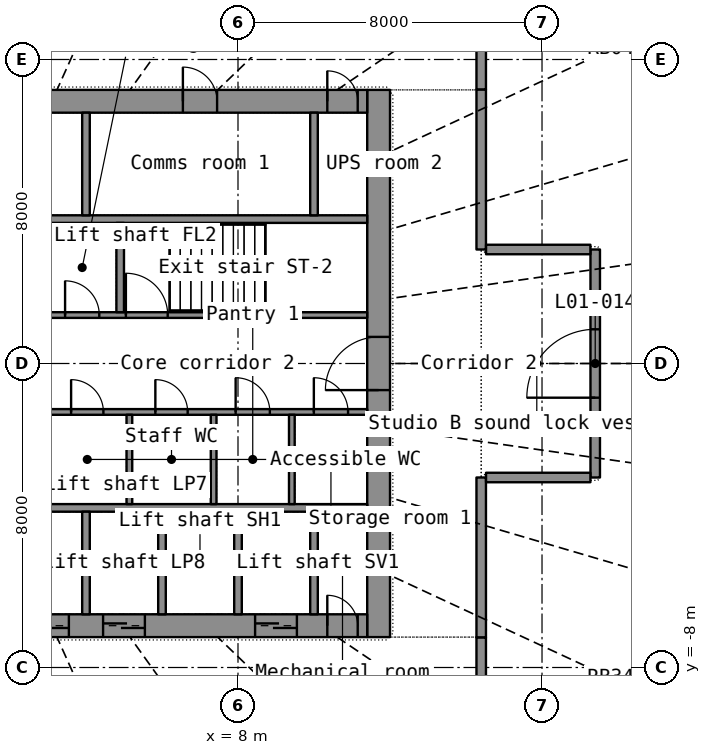
"""IFC4 building model, lengths in metres.
Left out: names, types, materials, properties, quantities, classifications, styles, units other than length and angle.
Written with IfcOpenShell. Run it as: python <this file> out.ifc"""

import sys

from ifc_helpers import new_model, si_unit, direction, frame, frame_2d, origin, place, context, subcontext, project, spatial, rectangle, extrude, element, fill, save


model = new_model("IFC4")
c1 = context("Model", 3, precision=1e-05, world=origin(), true_north=direction((0.0, 1.0)))
c2 = subcontext(c1, "Body", "Model", "MODEL_VIEW")
j1 = project(units=[si_unit("LENGTHUNIT", "METRE"), si_unit("PLANEANGLEUNIT", "RADIAN")], contexts=[c1])
p1 = place(None, origin())
s1 = spatial("IfcSite", under=j1, at=p1, CompositionType="ELEMENT")
p2 = place(p1, origin())
s2 = spatial("IfcBuilding", under=s1, at=p2, CompositionType="ELEMENT")
p3 = place(p2, frame((0.0, 0.0, 7.0)))
s3 = spatial("IfcBuildingStorey", under=s2, at=p3, CompositionType="ELEMENT", Elevation=7.0)
p4 = place(p3, frame((11.7, -7.2, 0.0), z_axis=(0.0, 0.0, 1.0), x_axis=(0.0, 1.0, 0.0)))
e1 = element("IfcWall", 1, at=p4, inside=s3, PredefinedType="SHEAR", context=c2, shape_type="SweptSolid", body=[
    extrude(rectangle(XDim=14.4, YDim=0.6, at=frame_2d((7.2, 0.0))), origin(), (0.0, 0.0, 1.0), 6.1),
])
p5 = place(p4, frame((6.5, 0.0, 0.0)))
e2 = element("IfcOpeningElement", 2, at=p5, cuts=e1, PredefinedType="OPENING", context=c2, shape_type="SweptSolid", body=[
    extrude(rectangle(XDim=1.4, YDim=2.2, at=frame_2d((0.7, 1.1))), frame((0.0, 0.31, 0.0), z_axis=(0.0, -1.0, 0.0), x_axis=(1.0, 0.0, 0.0)), (0.0, 0.0, 1.0), 0.62),
])
p6 = place(p3, frame((-11.4, -6.9, 0.0), z_axis=(0.0, 0.0, 1.0), x_axis=(1.0, 0.0, 0.0)))
e3 = element("IfcWall", 3, at=p6, inside=s3, PredefinedType="SHEAR", context=c2, shape_type="SweptSolid", body=[
    extrude(rectangle(XDim=22.8, YDim=0.6, at=frame_2d((11.4, 0.0))), origin(), (0.0, 0.0, 1.0), 6.1),
])
p7 = place(p6, frame((1.85, 0.0, 0.0)))
e4 = element("IfcOpeningElement", 4, at=p7, cuts=e3, PredefinedType="OPENING", context=c2, shape_type="SweptSolid", body=[
    extrude(rectangle(XDim=1.1, YDim=2.2, at=frame_2d((0.55, 1.1))), frame((0.0, 0.31, 0.0), z_axis=(0.0, -1.0, 0.0), x_axis=(1.0, 0.0, 0.0)), (0.0, 0.0, 1.0), 0.62),
])
p8 = place(p6, frame((3.85, 0.0, 0.0)))
e5 = element("IfcOpeningElement", 5, at=p8, cuts=e3, PredefinedType="OPENING", context=c2, shape_type="SweptSolid", body=[
    extrude(rectangle(XDim=1.1, YDim=2.2, at=frame_2d((0.55, 1.1))), frame((0.0, 0.31, 0.0), z_axis=(0.0, -1.0, 0.0), x_axis=(1.0, 0.0, 0.0)), (0.0, 0.0, 1.0), 0.62),
])
p9 = place(p6, frame((5.85, 0.0, 0.0)))
e6 = element("IfcOpeningElement", 6, at=p9, cuts=e3, PredefinedType="OPENING", context=c2, shape_type="SweptSolid", body=[
    extrude(rectangle(XDim=1.1, YDim=2.2, at=frame_2d((0.55, 1.1))), frame((0.0, 0.31, 0.0), z_axis=(0.0, -1.0, 0.0), x_axis=(1.0, 0.0, 0.0)), (0.0, 0.0, 1.0), 0.62),
])
p10 = place(p6, frame((7.85, 0.0, 0.0)))
e7 = element("IfcOpeningElement", 7, at=p10, cuts=e3, PredefinedType="OPENING", context=c2, shape_type="SweptSolid", body=[
    extrude(rectangle(XDim=1.1, YDim=2.2, at=frame_2d((0.55, 1.1))), frame((0.0, 0.31, 0.0), z_axis=(0.0, -1.0, 0.0), x_axis=(1.0, 0.0, 0.0)), (0.0, 0.0, 1.0), 0.62),
])
p11 = place(p6, frame((9.85, 0.0, 0.0)))
e8 = element("IfcOpeningElement", 8, at=p11, cuts=e3, PredefinedType="OPENING", context=c2, shape_type="SweptSolid", body=[
    extrude(rectangle(XDim=1.1, YDim=2.2, at=frame_2d((0.55, 1.1))), frame((0.0, 0.31, 0.0), z_axis=(0.0, -1.0, 0.0), x_axis=(1.0, 0.0, 0.0)), (0.0, 0.0, 1.0), 0.62),
])
p12 = place(p6, frame((11.85, 0.0, 0.0)))
e9 = element("IfcOpeningElement", 9, at=p12, cuts=e3, PredefinedType="OPENING", context=c2, shape_type="SweptSolid", body=[
    extrude(rectangle(XDim=1.1, YDim=2.2, at=frame_2d((0.55, 1.1))), frame((0.0, 0.31, 0.0), z_axis=(0.0, -1.0, 0.0), x_axis=(1.0, 0.0, 0.0)), (0.0, 0.0, 1.0), 0.62),
])
p13 = place(p6, frame((13.85, 0.0, 0.0)))
e10 = element("IfcOpeningElement", 10, at=p13, cuts=e3, PredefinedType="OPENING", context=c2, shape_type="SweptSolid", body=[
    extrude(rectangle(XDim=1.1, YDim=2.2, at=frame_2d((0.55, 1.1))), frame((0.0, 0.31, 0.0), z_axis=(0.0, -1.0, 0.0), x_axis=(1.0, 0.0, 0.0)), (0.0, 0.0, 1.0), 0.62),
])
p14 = place(p6, frame((15.85, 0.0, 0.0)))
e11 = element("IfcOpeningElement", 11, at=p14, cuts=e3, PredefinedType="OPENING", context=c2, shape_type="SweptSolid", body=[
    extrude(rectangle(XDim=1.1, YDim=2.2, at=frame_2d((0.55, 1.1))), frame((0.0, 0.31, 0.0), z_axis=(0.0, -1.0, 0.0), x_axis=(1.0, 0.0, 0.0)), (0.0, 0.0, 1.0), 0.62),
])
p15 = place(p6, frame((19.85, 0.0, 0.0)))
e12 = element("IfcOpeningElement", 12, at=p15, cuts=e3, PredefinedType="OPENING", context=c2, shape_type="SweptSolid", body=[
    extrude(rectangle(XDim=1.1, YDim=2.2, at=frame_2d((0.55, 1.1))), frame((0.0, 0.31, 0.0), z_axis=(0.0, -1.0, 0.0), x_axis=(1.0, 0.0, 0.0)), (0.0, 0.0, 1.0), 0.62),
])
p16 = place(p6, frame((0.25, 0.0, 0.0)))
e13 = element("IfcOpeningElement", 13, at=p16, cuts=e3, PredefinedType="OPENING", context=c2, shape_type="SweptSolid", body=[
    extrude(rectangle(XDim=0.8, YDim=2.05, at=frame_2d((0.4, 1.025))), frame((0.0, 0.31, 0.0), z_axis=(0.0, -1.0, 0.0), x_axis=(1.0, 0.0, 0.0)), (0.0, 0.0, 1.0), 0.62),
])
p17 = place(p6, frame((21.75, 0.0, 0.0)))
e14 = element("IfcOpeningElement", 14, at=p17, cuts=e3, PredefinedType="OPENING", context=c2, shape_type="SweptSolid", body=[
    extrude(rectangle(XDim=0.8, YDim=2.05, at=frame_2d((0.4, 1.025))), frame((0.0, 0.31, 0.0), z_axis=(0.0, -1.0, 0.0), x_axis=(1.0, 0.0, 0.0)), (0.0, 0.0, 1.0), 0.62),
])
p18 = place(p3, frame((-11.4, 6.9, 0.0), z_axis=(0.0, 0.0, 1.0), x_axis=(1.0, 0.0, 0.0)))
e15 = element("IfcWall", 15, at=p18, inside=s3, PredefinedType="SHEAR", context=c2, shape_type="SweptSolid", body=[
    extrude(rectangle(XDim=22.8, YDim=0.6, at=frame_2d((11.4, 0.0))), origin(), (0.0, 0.0, 1.0), 6.1),
])
p19 = place(p18, frame((1.85, 0.0, 0.0)))
e16 = element("IfcOpeningElement", 16, at=p19, cuts=e15, PredefinedType="OPENING", context=c2, shape_type="SweptSolid", body=[
    extrude(rectangle(XDim=1.1, YDim=2.2, at=frame_2d((0.55, 1.1))), frame((0.0, 0.31, 0.0), z_axis=(0.0, -1.0, 0.0), x_axis=(1.0, 0.0, 0.0)), (0.0, 0.0, 1.0), 0.62),
])
p20 = place(p18, frame((6.95, 0.0, 0.0)))
e17 = element("IfcOpeningElement", 17, at=p20, cuts=e15, PredefinedType="OPENING", context=c2, shape_type="SweptSolid", body=[
    extrude(rectangle(XDim=0.9, YDim=2.1, at=frame_2d((0.45, 1.05))), frame((0.0, 0.31, 0.0), z_axis=(0.0, -1.0, 0.0), x_axis=(1.0, 0.0, 0.0)), (0.0, 0.0, 1.0), 0.62),
])
p21 = place(p18, frame((11.95, 0.0, 0.0)))
e18 = element("IfcOpeningElement", 18, at=p21, cuts=e15, PredefinedType="OPENING", context=c2, shape_type="SweptSolid", body=[
    extrude(rectangle(XDim=0.9, YDim=2.1, at=frame_2d((0.45, 1.05))), frame((0.0, 0.31, 0.0), z_axis=(0.0, -1.0, 0.0), x_axis=(1.0, 0.0, 0.0)), (0.0, 0.0, 1.0), 0.62),
])
p22 = place(p18, frame((17.95, 0.0, 0.0)))
e19 = element("IfcOpeningElement", 19, at=p22, cuts=e15, PredefinedType="OPENING", context=c2, shape_type="SweptSolid", body=[
    extrude(rectangle(XDim=0.9, YDim=2.1, at=frame_2d((0.45, 1.05))), frame((0.0, 0.31, 0.0), z_axis=(0.0, -1.0, 0.0), x_axis=(1.0, 0.0, 0.0)), (0.0, 0.0, 1.0), 0.62),
])
p23 = place(p18, frame((0.25, 0.0, 0.0)))
e20 = element("IfcOpeningElement", 20, at=p23, cuts=e15, PredefinedType="OPENING", context=c2, shape_type="SweptSolid", body=[
    extrude(rectangle(XDim=0.8, YDim=2.05, at=frame_2d((0.4, 1.025))), frame((0.0, 0.31, 0.0), z_axis=(0.0, -1.0, 0.0), x_axis=(1.0, 0.0, 0.0)), (0.0, 0.0, 1.0), 0.62),
])
p24 = place(p18, frame((21.75, 0.0, 0.0)))
e21 = element("IfcOpeningElement", 21, at=p24, cuts=e15, PredefinedType="OPENING", context=c2, shape_type="SweptSolid", body=[
    extrude(rectangle(XDim=0.8, YDim=2.05, at=frame_2d((0.4, 1.025))), frame((0.0, 0.31, 0.0), z_axis=(0.0, -1.0, 0.0), x_axis=(1.0, 0.0, 0.0)), (0.0, 0.0, 1.0), 0.62),
])
for number, where, z_axis, x_axis in (
    (22, (-11.4, -3.8, 0.0), (0.0, 0.0, 1.0), (1.0, 0.0, 0.0)),
    (23, (-11.4, 3.8, 0.0), (0.0, 0.0, 1.0), (1.0, 0.0, 0.0)),
):
    element("IfcWall", number, at=place(p3, frame(where, z_axis=z_axis, x_axis=x_axis)), inside=s3, PredefinedType="SHEAR", context=c2, shape_type="SweptSolid", body=[
        extrude(rectangle(XDim=22.8, YDim=0.2, at=frame_2d((11.4, 0.0))), origin(), (0.0, 0.0, 1.0), 6.1),
    ])
for number, where, z_axis, x_axis in (
    (24, (4.0, -6.6, 0.0), (0.0, 0.0, 1.0), (0.0, 1.0, 0.0)),
    (25, (6.0, -6.6, 0.0), (0.0, 0.0, 1.0), (0.0, 1.0, 0.0)),
    (26, (8.0, -6.6, 0.0), (0.0, 0.0, 1.0), (0.0, 1.0, 0.0)),
    (27, (10.0, -6.6, 0.0), (0.0, 0.0, 1.0), (0.0, 1.0, 0.0)),
    (28, (10.0, 3.9, 0.0), (0.0, 0.0, 1.0), (0.0, 1.0, 0.0)),
):
    element("IfcWall", number, at=place(p3, frame(where, z_axis=z_axis, x_axis=x_axis)), inside=s3, PredefinedType="SHEAR", context=c2, shape_type="SweptSolid", body=[
        extrude(rectangle(XDim=2.7, YDim=0.2, at=frame_2d((1.35, 0.0))), origin(), (0.0, 0.0, 1.0), 6.1),
    ])
p25 = place(p3, frame((4.0, 3.9, 0.0), z_axis=(0.0, 0.0, 1.0), x_axis=(0.0, 1.0, 0.0)))
e29 = element("IfcWall", 29, at=p25, inside=s3, PredefinedType="PARTITIONING", context=c2, shape_type="SweptSolid", body=[
    extrude(rectangle(XDim=2.7, YDim=0.2, at=frame_2d((1.35, 0.0))), origin(), (0.0, 0.0, 1.0), 6.1),
])
p26 = place(p3, frame((3.0, -1.275, 0.0), z_axis=(0.0, 0.0, 1.0), x_axis=(1.0, 0.0, 0.0)))
e30 = element("IfcWall", 30, at=p26, inside=s3, PredefinedType="PARTITIONING", context=c2, shape_type="SweptSolid", body=[
    extrude(rectangle(XDim=8.4, YDim=0.15, at=frame_2d((4.2, 0.0))), origin(), (0.0, 0.0, 1.0), 6.1),
])
p27 = place(p26, frame((0.608, 0.0, 0.0)))
e31 = element("IfcOpeningElement", 31, at=p27, cuts=e30, PredefinedType="OPENING", context=c2, shape_type="SweptSolid", body=[
    extrude(rectangle(XDim=0.85, YDim=2.1, at=frame_2d((0.425, 1.05))), frame((0.0, 0.085, 0.0), z_axis=(0.0, -1.0, 0.0), x_axis=(1.0, 0.0, 0.0)), (0.0, 0.0, 1.0), 0.17),
])
p28 = place(p26, frame((2.825, 0.0, 0.0)))
e32 = element("IfcOpeningElement", 32, at=p28, cuts=e30, PredefinedType="OPENING", context=c2, shape_type="SweptSolid", body=[
    extrude(rectangle(XDim=0.85, YDim=2.1, at=frame_2d((0.425, 1.05))), frame((0.0, 0.085, 0.0), z_axis=(0.0, -1.0, 0.0), x_axis=(1.0, 0.0, 0.0)), (0.0, 0.0, 1.0), 0.17),
])
p29 = place(p26, frame((4.938, 0.0, 0.0)))
e33 = element("IfcOpeningElement", 33, at=p29, cuts=e30, PredefinedType="OPENING", context=c2, shape_type="SweptSolid", body=[
    extrude(rectangle(XDim=0.9, YDim=2.1, at=frame_2d((0.45, 1.05))), frame((0.0, 0.085, 0.0), z_axis=(0.0, -1.0, 0.0), x_axis=(1.0, 0.0, 0.0)), (0.0, 0.0, 1.0), 0.17),
])
p30 = place(p26, frame((6.996, 0.0, 0.0)))
e34 = element("IfcOpeningElement", 34, at=p30, cuts=e30, PredefinedType="OPENING", context=c2, shape_type="SweptSolid", body=[
    extrude(rectangle(XDim=0.9, YDim=2.1, at=frame_2d((0.45, 1.05))), frame((0.0, 0.085, 0.0), z_axis=(0.0, -1.0, 0.0), x_axis=(1.0, 0.0, 0.0)), (0.0, 0.0, 1.0), 0.17),
])
p31 = place(p3, frame((3.0, 1.275, 0.0), z_axis=(0.0, 0.0, 1.0), x_axis=(1.0, 0.0, 0.0)))
e35 = element("IfcWall", 35, at=p31, inside=s3, PredefinedType="SHEAR", context=c2, shape_type="SweptSolid", body=[
    extrude(rectangle(XDim=8.4, YDim=0.15, at=frame_2d((4.2, 0.0))), origin(), (0.0, 0.0, 1.0), 6.1),
])
p32 = place(p31, frame((2.05, 0.0, 0.0)))
e36 = element("IfcOpeningElement", 36, at=p32, cuts=e35, PredefinedType="OPENING", context=c2, shape_type="SweptSolid", body=[
    extrude(rectangle(XDim=1.1, YDim=2.15, at=frame_2d((0.55, 1.075))), frame((0.0, 0.085, 0.0), z_axis=(0.0, -1.0, 0.0), x_axis=(1.0, 0.0, 0.0)), (0.0, 0.0, 1.0), 0.17),
])
p33 = place(p31, frame((0.45, 0.0, 0.0)))
e37 = element("IfcOpeningElement", 37, at=p33, cuts=e35, PredefinedType="OPENING", context=c2, shape_type="SweptSolid", body=[
    extrude(rectangle(XDim=0.9, YDim=2.1, at=frame_2d((0.45, 1.05))), frame((0.0, 0.085, 0.0), z_axis=(0.0, -1.0, 0.0), x_axis=(1.0, 0.0, 0.0)), (0.0, 0.0, 1.0), 0.17),
])
p34 = place(p3, frame((4.9, 1.35, 0.0), z_axis=(0.0, 0.0, 1.0), x_axis=(0.0, 1.0, 0.0)))
e38 = element("IfcWall", 38, at=p34, inside=s3, PredefinedType="SHEAR", context=c2, shape_type="SweptSolid", body=[
    extrude(rectangle(XDim=2.35, YDim=0.2, at=frame_2d((1.175, 0.0))), origin(), (0.0, 0.0, 1.0), 6.1),
])
for number, where, z_axis, x_axis in (
    (39, (5.142, -3.7, 0.0), (0.0, 0.0, 1.0), (0.0, 1.0, 0.0)),
    (40, (7.359, -3.7, 0.0), (0.0, 0.0, 1.0), (0.0, 1.0, 0.0)),
    (41, (9.417, -3.7, 0.0), (0.0, 0.0, 1.0), (0.0, 1.0, 0.0)),
):
    element("IfcWall", number, at=place(p3, frame(where, z_axis=z_axis, x_axis=x_axis)), inside=s3, PredefinedType="PARTITIONING", context=c2, shape_type="SweptSolid", body=[
        extrude(rectangle(XDim=2.35, YDim=0.15, at=frame_2d((1.175, 0.0))), origin(), (0.0, 0.0, 1.0), 6.1),
    ])
p35 = place(p3, frame((17.4, -3.0, 0.0), z_axis=(0.0, 0.0, 1.0), x_axis=(0.0, 1.0, 0.0)))
e42 = element("IfcWall", 42, at=p35, inside=s3, PredefinedType="PARTITIONING", context=c2, shape_type="SweptSolid", body=[
    extrude(rectangle(XDim=6.0, YDim=0.25, at=frame_2d((3.0, 0.0))), origin(), (0.0, 0.0, 1.0), 5.1),
])
p36 = place(p35, frame((2.1, 0.0, 0.0)))
e43 = element("IfcOpeningElement", 43, at=p36, cuts=e42, PredefinedType="OPENING", context=c2, shape_type="SweptSolid", body=[
    extrude(rectangle(XDim=1.8, YDim=2.4, at=frame_2d((0.9, 1.2))), frame((0.0, 0.135, 0.0), z_axis=(0.0, -1.0, 0.0), x_axis=(1.0, 0.0, 0.0)), (0.0, 0.0, 1.0), 0.27),
])
for number, where, z_axis, x_axis in (
    (44, (14.4, -7.212, 0.0), (0.0, 0.0, 1.0), (0.0, 1.0, 0.0)),
    (45, (14.4, 3.0, 0.0), (0.0, 0.0, 1.0), (0.0, 1.0, 0.0)),
):
    element("IfcWall", number, at=place(p3, frame(where, z_axis=z_axis, x_axis=x_axis)), inside=s3, PredefinedType="PARTITIONING", context=c2, shape_type="SweptSolid", body=[
        extrude(rectangle(XDim=4.212, YDim=0.25, at=frame_2d((2.106, 0.0))), origin(), (0.0, 0.0, 1.0), 5.1),
    ])
for number, where, z_axis, x_axis in (
    (46, (14.4, -10.199, 0.0), (0.0, 0.0, 1.0), (0.0, 1.0, 0.0)),
    (47, (14.4, 7.213, 0.0), (0.0, 0.0, 1.0), (0.0, 1.0, 0.0)),
):
    element("IfcWall", number, at=place(p3, frame(where, z_axis=z_axis, x_axis=x_axis)), inside=s3, PredefinedType="PARTITIONING", context=c2, shape_type="SweptSolid", body=[
        extrude(rectangle(XDim=2.986, YDim=0.25, at=frame_2d((1.493, 0.0))), origin(), (0.0, 0.0, 1.0), 5.1),
    ])
for number, where, z_axis, x_axis in (
    (48, (14.527, -3.0, 0.0), (0.0, 0.0, 1.0), (1.0, 0.0, 0.0)),
    (49, (17.273, 3.0, 0.0), (0.0, 0.0, 1.0), (-1.0, 0.0, 0.0)),
):
    element("IfcWall", number, at=place(p3, frame(where, z_axis=z_axis, x_axis=x_axis)), inside=s3, PredefinedType="PARTITIONING", context=c2, shape_type="SweptSolid", body=[
        extrude(rectangle(XDim=2.746, YDim=0.25, at=frame_2d((1.373, 0.0))), origin(), (0.0, 0.0, 1.0), 5.1),
    ])
p37 = place(p13, origin())
e50 = element("IfcDoor", 50, at=p37, inside=s3, OperationType="DOUBLE_DOOR_SLIDING", PredefinedType="DOOR", context=c2, shape_type="SweptSolid", body=[
    extrude(rectangle(XDim=1.1, YDim=2.2, at=frame_2d((0.55, 1.1))), frame((0.0, 0.025, 0.0), z_axis=(0.0, -1.0, 0.0), x_axis=(1.0, 0.0, 0.0)), (0.0, 0.0, 1.0), 0.05),
])
fill(e10, e50)
p38 = place(p14, origin())
e51 = element("IfcDoor", 51, at=p38, inside=s3, OperationType="DOUBLE_DOOR_SLIDING", PredefinedType="DOOR", context=c2, shape_type="SweptSolid", body=[
    extrude(rectangle(XDim=1.1, YDim=2.2, at=frame_2d((0.55, 1.1))), frame((0.0, 0.025, 0.0), z_axis=(0.0, -1.0, 0.0), x_axis=(1.0, 0.0, 0.0)), (0.0, 0.0, 1.0), 0.05),
])
fill(e11, e51)
p39 = place(p15, origin())
e52 = element("IfcDoor", 52, at=p39, inside=s3, OperationType="DOUBLE_DOOR_SLIDING", PredefinedType="DOOR", context=c2, shape_type="SweptSolid", body=[
    extrude(rectangle(XDim=1.1, YDim=2.2, at=frame_2d((0.55, 1.1))), frame((0.0, 0.025, 0.0), z_axis=(0.0, -1.0, 0.0), x_axis=(1.0, 0.0, 0.0)), (0.0, 0.0, 1.0), 0.05),
])
fill(e12, e52)
p40 = place(p17, origin())
e53 = element("IfcDoor", 53, at=p40, inside=s3, OperationType="SINGLE_SWING_LEFT", PredefinedType="DOOR", context=c2, shape_type="SweptSolid", body=[
    extrude(rectangle(XDim=0.8, YDim=2.05, at=frame_2d((0.4, 1.025))), frame((0.0, 0.025, 0.0), z_axis=(0.0, -1.0, 0.0), x_axis=(1.0, 0.0, 0.0)), (0.0, 0.0, 1.0), 0.05),
])
fill(e14, e53)
p41 = place(p22, origin())
e54 = element("IfcDoor", 54, at=p41, inside=s3, OperationType="SINGLE_SWING_LEFT", PredefinedType="DOOR", context=c2, shape_type="SweptSolid", body=[
    extrude(rectangle(XDim=0.9, YDim=2.1, at=frame_2d((0.45, 1.05))), frame((0.0, 0.025, 0.0), z_axis=(0.0, -1.0, 0.0), x_axis=(1.0, 0.0, 0.0)), (0.0, 0.0, 1.0), 0.05),
])
fill(e19, e54)
p42 = place(p24, origin())
e55 = element("IfcDoor", 55, at=p42, inside=s3, OperationType="SINGLE_SWING_LEFT", PredefinedType="DOOR", context=c2, shape_type="SweptSolid", body=[
    extrude(rectangle(XDim=0.8, YDim=2.05, at=frame_2d((0.4, 1.025))), frame((0.0, 0.025, 0.0), z_axis=(0.0, -1.0, 0.0), x_axis=(1.0, 0.0, 0.0)), (0.0, 0.0, 1.0), 0.05),
])
fill(e21, e55)
p43 = place(p5, origin())
e56 = element("IfcDoor", 56, at=p43, inside=s3, OperationType="DOUBLE_DOOR_SINGLE_SWING", PredefinedType="DOOR", context=c2, shape_type="SweptSolid", body=[
    extrude(rectangle(XDim=1.4, YDim=2.2, at=frame_2d((0.7, 1.1))), frame((0.0, 0.025, 0.0), z_axis=(0.0, -1.0, 0.0), x_axis=(1.0, 0.0, 0.0)), (0.0, 0.0, 1.0), 0.05),
])
fill(e2, e56)
p44 = place(p32, origin())
e57 = element("IfcDoor", 57, at=p44, inside=s3, OperationType="SINGLE_SWING_LEFT", PredefinedType="DOOR", context=c2, shape_type="SweptSolid", body=[
    extrude(rectangle(XDim=1.1, YDim=2.15, at=frame_2d((0.55, 1.075))), frame((0.0, 0.025, 0.0), z_axis=(0.0, -1.0, 0.0), x_axis=(1.0, 0.0, 0.0)), (0.0, 0.0, 1.0), 0.05),
])
fill(e36, e57)
p45 = place(p27, origin())
e58 = element("IfcDoor", 58, at=p45, inside=s3, OperationType="SINGLE_SWING_LEFT", PredefinedType="DOOR", context=c2, shape_type="SweptSolid", body=[
    extrude(rectangle(XDim=0.85, YDim=2.1, at=frame_2d((0.425, 1.05))), frame((0.0, 0.025, 0.0), z_axis=(0.0, -1.0, 0.0), x_axis=(1.0, 0.0, 0.0)), (0.0, 0.0, 1.0), 0.05),
])
fill(e31, e58)
p46 = place(p28, origin())
e59 = element("IfcDoor", 59, at=p46, inside=s3, OperationType="SINGLE_SWING_LEFT", PredefinedType="DOOR", context=c2, shape_type="SweptSolid", body=[
    extrude(rectangle(XDim=0.85, YDim=2.1, at=frame_2d((0.425, 1.05))), frame((0.0, 0.025, 0.0), z_axis=(0.0, -1.0, 0.0), x_axis=(1.0, 0.0, 0.0)), (0.0, 0.0, 1.0), 0.05),
])
fill(e32, e59)
p47 = place(p29, origin())
e60 = element("IfcDoor", 60, at=p47, inside=s3, OperationType="SINGLE_SWING_LEFT", PredefinedType="DOOR", context=c2, shape_type="SweptSolid", body=[
    extrude(rectangle(XDim=0.9, YDim=2.1, at=frame_2d((0.45, 1.05))), frame((0.0, 0.025, 0.0), z_axis=(0.0, -1.0, 0.0), x_axis=(1.0, 0.0, 0.0)), (0.0, 0.0, 1.0), 0.05),
])
fill(e33, e60)
p48 = place(p30, origin())
e61 = element("IfcDoor", 61, at=p48, inside=s3, OperationType="SINGLE_SWING_LEFT", PredefinedType="DOOR", context=c2, shape_type="SweptSolid", body=[
    extrude(rectangle(XDim=0.9, YDim=2.1, at=frame_2d((0.45, 1.05))), frame((0.0, 0.025, 0.0), z_axis=(0.0, -1.0, 0.0), x_axis=(1.0, 0.0, 0.0)), (0.0, 0.0, 1.0), 0.05),
])
fill(e34, e61)
p49 = place(p33, origin())
e62 = element("IfcDoor", 62, at=p49, inside=s3, OperationType="SINGLE_SWING_LEFT", PredefinedType="DOOR", context=c2, shape_type="SweptSolid", body=[
    extrude(rectangle(XDim=0.9, YDim=2.1, at=frame_2d((0.45, 1.05))), frame((0.0, 0.025, 0.0), z_axis=(0.0, -1.0, 0.0), x_axis=(1.0, 0.0, 0.0)), (0.0, 0.0, 1.0), 0.05),
])
fill(e37, e62)
p50 = place(p36, origin())
e63 = element("IfcDoor", 63, at=p50, inside=s3, OperationType="DOUBLE_DOOR_SINGLE_SWING", PredefinedType="DOOR", context=c2, shape_type="SweptSolid", body=[
    extrude(rectangle(XDim=1.8, YDim=2.4, at=frame_2d((0.9, 1.2))), frame((0.0, 0.025, 0.0), z_axis=(0.0, -1.0, 0.0), x_axis=(1.0, 0.0, 0.0)), (0.0, 0.0, 1.0), 0.05),
])
fill(e43, e63)
save(model, sys.argv[1])
